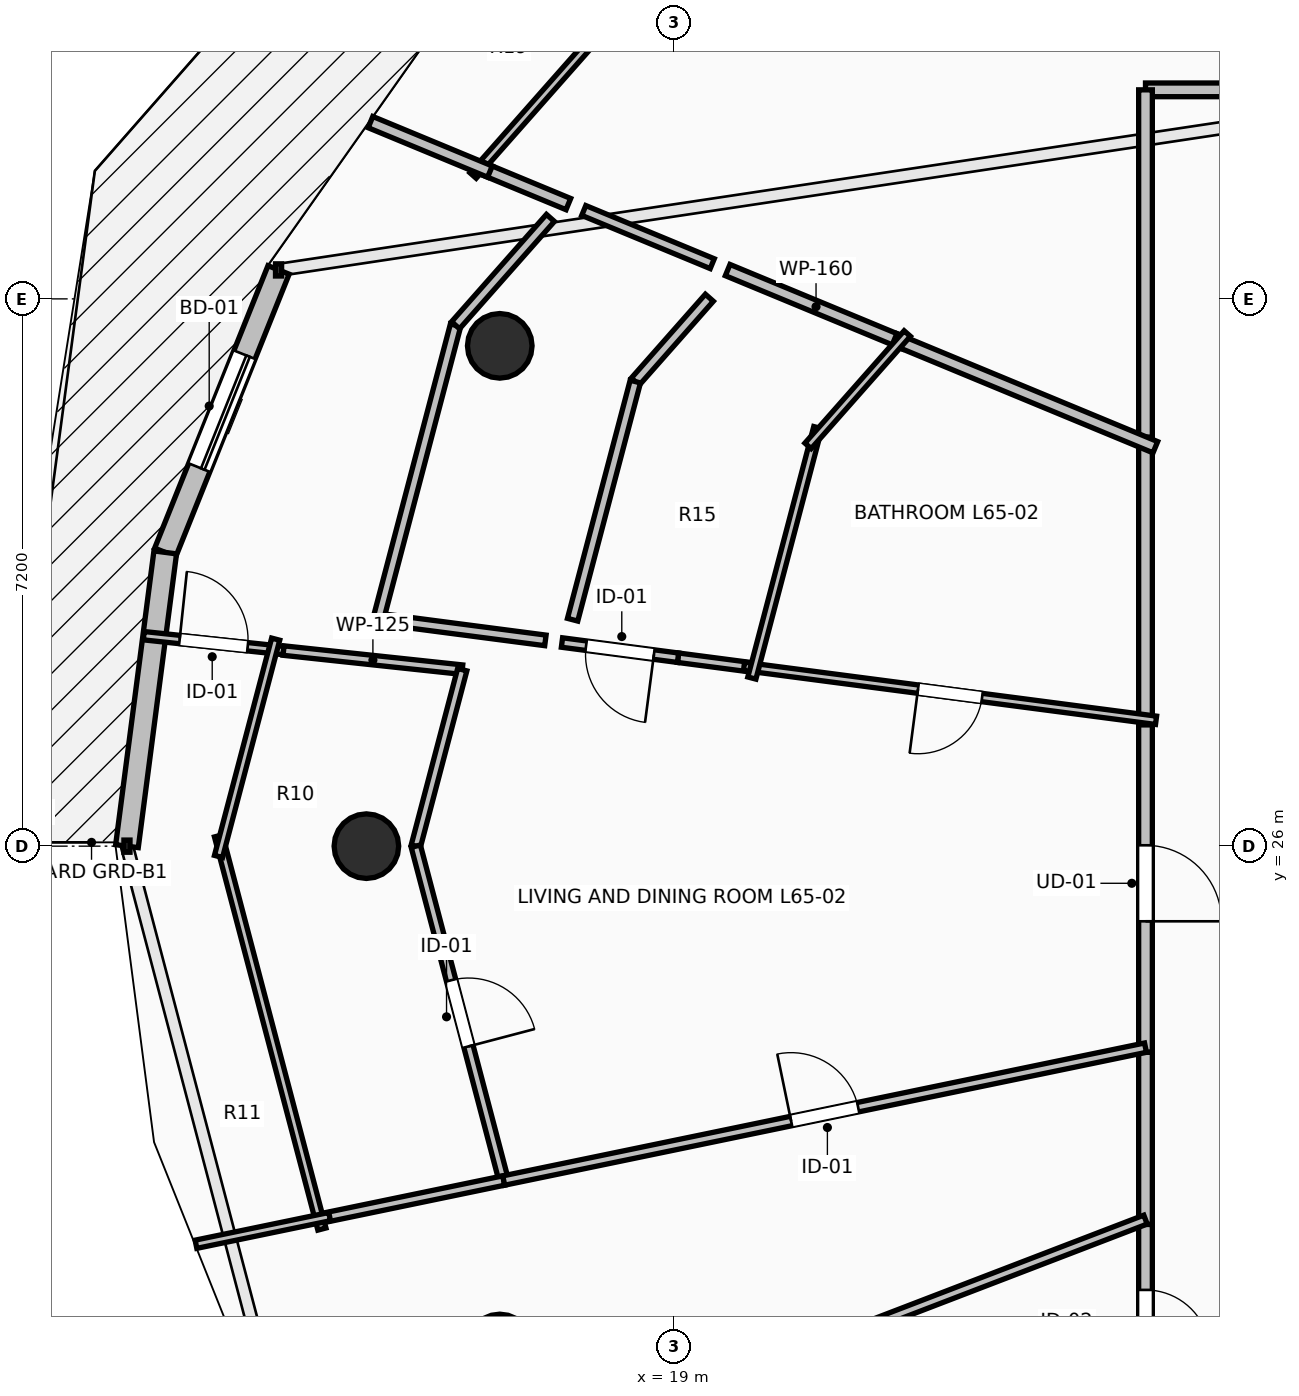
"""IFC4 building model, lengths in metres.
Left out: names, types, materials, properties, quantities, classifications, styles, units other than length and angle.
Written with IfcOpenShell. Run it as: python <this file> out.ifc"""

import sys

from ifc_helpers import new_model, si_unit, direction, frame, frame_2d, origin, origin_2d, place, context, subcontext, project, spatial, rectangle, circle, extrude, element, fill, save


model = new_model("IFC4")
c1 = context("Model", 3, precision=1e-05, world=origin(), true_north=direction((0.0, 1.0)))
c2 = subcontext(c1, "Body", "Model", "MODEL_VIEW")
j1 = project(units=[si_unit("LENGTHUNIT", "METRE"), si_unit("PLANEANGLEUNIT", "RADIAN")], contexts=[c1])
p1 = place(None, origin())
s1 = spatial("IfcSite", under=j1, at=p1, CompositionType="ELEMENT")
p2 = place(p1, origin())
s2 = spatial("IfcBuilding", under=s1, at=p2, CompositionType="ELEMENT")
p3 = place(p2, frame((0.0, 0.0, 241.35)))
s3 = spatial("IfcBuildingStorey", under=s2, at=p3, CompositionType="ELEMENT", Elevation=241.35)
for number, where, z_axis, x_axis in (
    (1, (16.705, 32.582, 0.0), (0.0, 0.0, 1.0), (-0.924, 0.383, 0.0)),
    (2, (14.95, 26.0, 0.0), (0.0, 0.0, 1.0), (-1.0, 0.0, 0.0)),
    (3, (16.705, 19.418, 0.0), (0.0, 0.0, 1.0), (-0.924, -0.383, 0.0)),
):
    element("IfcColumn", number, at=place(p3, frame(where, z_axis=z_axis, x_axis=x_axis)), inside=s3, PredefinedType="COLUMN", context=c2, shape_type="SweptSolid", body=[
        extrude(circle(Radius=0.425, at=origin_2d()), origin(), (0.0, 0.0, 1.0), 3.55),
    ])
p4 = place(p3, frame((13.794, 33.581, 0.0), z_axis=(0.0, 0.0, 1.0), x_axis=(-0.37234708598, -0.928093555393, 0.0)))
e4 = element("IfcWall", 4, at=p4, inside=s3, PredefinedType="STANDARD", context=c2, shape_type="SweptSolid", body=[
    extrude(rectangle(XDim=4.004, YDim=0.3, at=frame_2d((2.002, 0.0))), origin(), (0.0, 0.0, 1.0), 3.29),
])
p5 = place(p4, frame((1.202, 0.0, 0.0)))
e5 = element("IfcOpeningElement", 5, at=p5, cuts=e4, PredefinedType="OPENING", context=c2, shape_type="SweptSolid", body=[
    extrude(rectangle(XDim=1.6, YDim=2.3, at=frame_2d((0.8, 1.15))), frame((0.0, 0.165, 0.0), z_axis=(0.0, -1.0, 0.0), x_axis=(1.0, 0.0, 0.0)), (0.0, 0.0, 1.0), 0.33),
])
p6 = place(p3, frame((12.303, 29.865, 0.0), z_axis=(0.0, 0.0, 1.0), x_axis=(-0.129167789917, -0.991622751881, 0.0)))
e6 = element("IfcWall", 6, at=p6, inside=s3, PredefinedType="STANDARD", context=c2, shape_type="SweptSolid", body=[
    extrude(rectangle(XDim=3.897, YDim=0.3, at=frame_2d((1.949, 0.0))), origin(), (0.0, 0.0, 1.0), 3.29),
])
p7 = place(p3, frame((34.999, 35.95, 0.0), z_axis=(0.0, 0.0, 1.0), x_axis=(-1.0, 0.0, 0.0)))
e7 = element("IfcWall", 7, at=p7, inside=s3, PredefinedType="PARTITIONING", context=c2, shape_type="SweptSolid", body=[
    extrude(rectangle(XDim=9.799, YDim=0.18, at=frame_2d((4.899, 0.0))), origin(), (0.0, 0.0, 1.0), 2.482),
])
p8 = place(p7, frame((4.399, 0.0, 0.0)))
e8 = element("IfcOpeningElement", 8, at=p8, cuts=e7, PredefinedType="OPENING", context=c2, shape_type="SweptSolid", body=[
    extrude(rectangle(XDim=1.0, YDim=2.15, at=frame_2d((0.5, 1.075))), frame((0.0, 0.105, 0.0), z_axis=(0.0, -1.0, 0.0), x_axis=(1.0, 0.0, 0.0)), (0.0, 0.0, 1.0), 0.21),
])
p9 = place(p3, frame((25.2, 35.95, 0.0), z_axis=(0.0, 0.0, 1.0), x_axis=(0.0, -1.0, 0.0)))
e9 = element("IfcWall", 9, at=p9, inside=s3, PredefinedType="PARTITIONING", context=c2, shape_type="SweptSolid", body=[
    extrude(rectangle(XDim=4.708, YDim=0.18, at=frame_2d((2.354, 0.0))), origin(), (0.0, 0.0, 1.0), 2.482),
])
p10 = place(p3, frame((25.2, 27.735, 0.0), z_axis=(0.0, 0.0, 1.0), x_axis=(0.0, -1.0, 0.0)))
e10 = element("IfcWall", 10, at=p10, inside=s3, PredefinedType="PARTITIONING", context=c2, shape_type="SweptSolid", body=[
    extrude(rectangle(XDim=4.447, YDim=0.18, at=frame_2d((2.224, 0.0))), origin(), (0.0, 0.0, 1.0), 2.482),
])
p11 = place(p10, frame((1.723, 0.0, 0.0)))
e11 = element("IfcOpeningElement", 11, at=p11, cuts=e10, PredefinedType="OPENING", context=c2, shape_type="SweptSolid", body=[
    extrude(rectangle(XDim=1.0, YDim=2.15, at=frame_2d((0.5, 1.075))), frame((0.0, 0.105, 0.0), z_axis=(0.0, -1.0, 0.0), x_axis=(1.0, 0.0, 0.0)), (0.0, 0.0, 1.0), 0.21),
])
p12 = place(p3, frame((25.2, 31.382, 0.0), z_axis=(0.0, 0.0, 1.0), x_axis=(0.0, -1.0, 0.0)))
e12 = element("IfcWall", 12, at=p12, inside=s3, PredefinedType="PARTITIONING", context=c2, shape_type="SweptSolid", body=[
    extrude(rectangle(XDim=3.787, YDim=0.18, at=frame_2d((1.894, 0.0))), origin(), (0.0, 0.0, 1.0), 2.482),
])
p13 = place(p3, frame((25.2, 23.288, 0.0), z_axis=(0.0, 0.0, 1.0), x_axis=(0.0, -1.0, 0.0)))
e13 = element("IfcWall", 13, at=p13, inside=s3, PredefinedType="PARTITIONING", context=c2, shape_type="SweptSolid", body=[
    extrude(rectangle(XDim=2.265, YDim=0.18, at=frame_2d((1.133, 0.0))), origin(), (0.0, 0.0, 1.0), 3.29),
])
p14 = place(p3, frame((25.2, 21.023, 0.0), z_axis=(0.0, 0.0, 1.0), x_axis=(0.0, -1.0, 0.0)))
e14 = element("IfcWall", 14, at=p14, inside=s3, PredefinedType="PARTITIONING", context=c2, shape_type="SweptSolid", body=[
    extrude(rectangle(XDim=2.572, YDim=0.18, at=frame_2d((1.286, 0.0))), origin(), (0.0, 0.0, 1.0), 3.29),
])
p15 = place(p14, frame((0.861, 0.0, 0.0)))
e15 = element("IfcOpeningElement", 15, at=p15, cuts=e14, PredefinedType="OPENING", context=c2, shape_type="SweptSolid", body=[
    extrude(rectangle(XDim=0.85, YDim=2.1, at=frame_2d((0.425, 1.05))), frame((0.0, 0.105, 0.0), z_axis=(0.0, -1.0, 0.0), x_axis=(1.0, 0.0, 0.0)), (0.0, 0.0, 1.0), 0.21),
])
p16 = place(p3, frame((20.444, 39.452, 0.0), z_axis=(0.0, 0.0, 1.0), x_axis=(-0.662167862663, -0.749355537549, 0.0)))
e16 = element("IfcWall", 16, at=p16, inside=s3, PredefinedType="PARTITIONING", context=c2, shape_type="SweptSolid", body=[
    extrude(rectangle(XDim=6.177, YDim=0.11, at=frame_2d((3.089, 0.0))), origin(), (0.0, 0.0, 1.0), 3.29),
])
p17 = place(p3, frame((16.446, 34.928, 0.0), z_axis=(0.0, 0.0, 1.0), x_axis=(0.923851056351, -0.382752172663, 0.0)))
e17 = element("IfcWall", 17, at=p17, inside=s3, PredefinedType="PARTITIONING", context=c2, shape_type="SweptSolid", body=[
    extrude(rectangle(XDim=1.257, YDim=0.16, at=frame_2d((0.628, 0.0))), origin(), (0.0, 0.0, 1.0), 3.29),
])
p18 = place(p3, frame((19.703, 33.579, 0.0), z_axis=(0.0, 0.0, 1.0), x_axis=(0.923878502515, -0.382685918986, 0.0)))
e18 = element("IfcWall", 18, at=p18, inside=s3, PredefinedType="PARTITIONING", context=c2, shape_type="SweptSolid", body=[
    extrude(rectangle(XDim=2.517, YDim=0.16, at=frame_2d((1.258, 0.0))), origin(), (0.0, 0.0, 1.0), 2.924),
])
p19 = place(p3, frame((21.899, 32.669, 0.0), z_axis=(0.0, 0.0, 1.0), x_axis=(0.9238685833, -0.382709865029, 0.0)))
e19 = element("IfcWall", 19, at=p19, inside=s3, PredefinedType="PARTITIONING", context=c2, shape_type="SweptSolid", body=[
    extrude(rectangle(XDim=3.713, YDim=0.16, at=frame_2d((1.857, 0.0))), origin(), (0.0, 0.0, 1.0), 2.972),
])
p20 = place(p3, frame((15.004, 35.526, 0.0), z_axis=(0.0, 0.0, 1.0), x_axis=(0.923843638485, -0.382770076719, 0.0)))
e20 = element("IfcWall", 20, at=p20, inside=s3, PredefinedType="PARTITIONING", context=c2, shape_type="SweptSolid", body=[
    extrude(rectangle(XDim=1.701, YDim=0.16, at=frame_2d((0.851, 0.0))), origin(), (0.0, 0.0, 1.0), 3.29),
])
p21 = place(p3, frame((20.057, 28.347, 0.0), z_axis=(0.0, 0.0, 1.0), x_axis=(-0.99150495655, 0.130068909188, 0.0)))
e21 = element("IfcWall", 21, at=p21, inside=s3, PredefinedType="PARTITIONING", context=c2, shape_type="SweptSolid", body=[
    extrude(rectangle(XDim=1.015, YDim=0.125, at=frame_2d((0.508, 0.0))), origin(), (0.0, 0.0, 1.0), 2.924),
])
p22 = place(p3, frame((19.05, 28.479, 0.0), z_axis=(0.0, 0.0, 1.0), x_axis=(-0.991536647804, 0.129827100648, 0.0)))
e22 = element("IfcWall", 22, at=p22, inside=s3, PredefinedType="PARTITIONING", context=c2, shape_type="SweptSolid", body=[
    extrude(rectangle(XDim=1.54, YDim=0.125, at=frame_2d((0.77, 0.0))), origin(), (0.0, 0.0, 1.0), 3.29),
])
p23 = place(p22, frame((0.32, 0.0, 0.0)))
e23 = element("IfcOpeningElement", 23, at=p23, cuts=e22, PredefinedType="OPENING", context=c2, shape_type="SweptSolid", body=[
    extrude(rectangle(XDim=0.9, YDim=2.1, at=frame_2d((0.45, 1.05))), frame((0.0, 0.077, 0.0), z_axis=(0.0, -1.0, 0.0), x_axis=(1.0, 0.0, 0.0)), (0.0, 0.0, 1.0), 0.155),
])
p24 = place(p3, frame((25.339, 27.656, 0.0), z_axis=(0.0, 0.0, 1.0), x_axis=(-0.991543288598, 0.129776372412, 0.0)))
e24 = element("IfcWall", 24, at=p24, inside=s3, PredefinedType="PARTITIONING", context=c2, shape_type="SweptSolid", body=[
    extrude(rectangle(XDim=5.467, YDim=0.11, at=frame_2d((2.733, 0.0))), origin(), (0.0, 0.0, 1.0), 2.482),
])
p25 = place(p24, frame((2.308, 0.0, 0.0)))
e25 = element("IfcOpeningElement", 25, at=p25, cuts=e24, PredefinedType="OPENING", context=c2, shape_type="SweptSolid", body=[
    extrude(rectangle(XDim=0.85, YDim=2.1, at=frame_2d((0.425, 1.05))), frame((0.0, 0.07, 0.0), z_axis=(0.0, -1.0, 0.0), x_axis=(1.0, 0.0, 0.0)), (0.0, 0.0, 1.0), 0.14),
])
p26 = place(p3, frame((12.021, 28.769, 0.0), z_axis=(0.0, 0.0, 1.0), x_axis=(0.994395705484, -0.105722187429, 0.0)))
e26 = element("IfcWall", 26, at=p26, inside=s3, PredefinedType="PARTITIONING", context=c2, shape_type="SweptSolid", body=[
    extrude(rectangle(XDim=1.85, YDim=0.11, at=frame_2d((0.925, 0.0))), origin(), (0.0, 0.0, 1.0), 3.29),
])
p27 = place(p26, frame((0.475, 0.0, 0.0)))
e27 = element("IfcOpeningElement", 27, at=p27, cuts=e26, PredefinedType="OPENING", context=c2, shape_type="SweptSolid", body=[
    extrude(rectangle(XDim=0.9, YDim=2.1, at=frame_2d((0.45, 1.05))), frame((0.0, 0.07, 0.0), z_axis=(0.0, -1.0, 0.0), x_axis=(1.0, 0.0, 0.0)), (0.0, 0.0, 1.0), 0.14),
])
p28 = place(p3, frame((13.86, 28.573, 0.0), z_axis=(0.0, 0.0, 1.0), x_axis=(0.994349321614, -0.106157555574, 0.0)))
e28 = element("IfcWall", 28, at=p28, inside=s3, PredefinedType="PARTITIONING", context=c2, shape_type="SweptSolid", body=[
    extrude(rectangle(XDim=2.364, YDim=0.125, at=frame_2d((1.182, 0.0))), origin(), (0.0, 0.0, 1.0), 2.874),
])
p29 = place(p3, frame((16.211, 28.322, 0.0), z_axis=(0.0, 0.0, 1.0), x_axis=(-0.254408212112, -0.96709692462, 0.0)))
e29 = element("IfcWall", 29, at=p29, inside=s3, PredefinedType="PARTITIONING", context=c2, shape_type="SweptSolid", body=[
    extrude(rectangle(XDim=2.401, YDim=0.125, at=frame_2d((1.201, 0.0))), origin(), (0.0, 0.0, 1.0), 2.482),
])
p30 = place(p3, frame((15.6, 26.0, 0.0), z_axis=(0.0, 0.0, 1.0), x_axis=(0.25436383836, -0.967108596661, 0.0)))
e30 = element("IfcWall", 30, at=p30, inside=s3, PredefinedType="PARTITIONING", context=c2, shape_type="SweptSolid", body=[
    extrude(rectangle(XDim=4.549, YDim=0.125, at=frame_2d((2.274, 0.0))), origin(), (0.0, 0.0, 1.0), 2.482),
])
p31 = place(p30, frame((1.824, 0.0, 0.0)))
e31 = element("IfcOpeningElement", 31, at=p31, cuts=e30, PredefinedType="OPENING", context=c2, shape_type="SweptSolid", body=[
    extrude(rectangle(XDim=0.9, YDim=2.1, at=frame_2d((0.45, 1.05))), frame((0.0, 0.077, 0.0), z_axis=(0.0, -1.0, 0.0), x_axis=(1.0, 0.0, 0.0)), (0.0, 0.0, 1.0), 0.155),
])
p32 = place(p3, frame((16.757, 21.601, 0.0), z_axis=(0.0, 0.0, 1.0), x_axis=(-0.979193678003, -0.2029279206, 0.0)))
e32 = element("IfcWall", 32, at=p32, inside=s3, PredefinedType="PARTITIONING", context=c2, shape_type="SweptSolid", body=[
    extrude(rectangle(XDim=2.479, YDim=0.125, at=frame_2d((1.24, 0.0))), origin(), (0.0, 0.0, 1.0), 2.874),
])
p33 = place(p3, frame((16.757, 21.601, 0.0), z_axis=(0.0, 0.0, 1.0), x_axis=(0.979226116247, 0.20277133244, 0.0)))
e33 = element("IfcWall", 33, at=p33, inside=s3, PredefinedType="PARTITIONING", context=c2, shape_type="SweptSolid", body=[
    extrude(rectangle(XDim=8.622, YDim=0.125, at=frame_2d((4.311, 0.0))), origin(), (0.0, 0.0, 1.0), 2.924),
])
p34 = place(p33, frame((3.861, 0.0, 0.0)))
e34 = element("IfcOpeningElement", 34, at=p34, cuts=e33, PredefinedType="OPENING", context=c2, shape_type="SweptSolid", body=[
    extrude(rectangle(XDim=0.9, YDim=2.1, at=frame_2d((0.45, 1.05))), frame((0.0, 0.077, 0.0), z_axis=(0.0, -1.0, 0.0), x_axis=(1.0, 0.0, 0.0)), (0.0, 0.0, 1.0), 0.155),
])
p35 = place(p3, frame((20.021, 28.212, 0.0), z_axis=(0.0, 0.0, 1.0), x_axis=(0.254539154478, 0.967062468943, 0.0)))
e35 = element("IfcWall", 35, at=p35, inside=s3, PredefinedType="PARTITIONING", context=c2, shape_type="SweptSolid", body=[
    extrude(rectangle(XDim=3.407, YDim=0.11, at=frame_2d((1.704, 0.0))), origin(), (0.0, 0.0, 1.0), 2.482),
])
p36 = place(p3, frame((20.76, 31.266, 0.0), z_axis=(0.0, 0.0, 1.0), x_axis=(0.662047420969, 0.749461948593, 0.0)))
e36 = element("IfcWall", 36, at=p36, inside=s3, PredefinedType="PARTITIONING", context=c2, shape_type="SweptSolid", body=[
    extrude(rectangle(XDim=1.972, YDim=0.11, at=frame_2d((0.986, 0.0))), origin(), (0.0, 0.0, 1.0), 3.29),
])
p37 = place(p3, frame((14.365, 20.963, 0.0), z_axis=(0.0, 0.0, 1.0), x_axis=(-0.254288836667, 0.967128320104, 0.0)))
e37 = element("IfcWall", 37, at=p37, inside=s3, PredefinedType="PARTITIONING", context=c2, shape_type="SweptSolid", body=[
    extrude(rectangle(XDim=5.349, YDim=0.11, at=frame_2d((2.674, 0.0))), origin(), (0.0, 0.0, 1.0), 3.29),
])
p38 = place(p3, frame((13.004, 25.865, 0.0), z_axis=(0.0, 0.0, 1.0), x_axis=(0.254448582557, 0.967086303716, 0.0)))
e38 = element("IfcWall", 38, at=p38, inside=s3, PredefinedType="PARTITIONING", context=c2, shape_type="SweptSolid", body=[
    extrude(rectangle(XDim=2.956, YDim=0.11, at=frame_2d((1.478, 0.0))), origin(), (0.0, 0.0, 1.0), 3.29),
])
p39 = place(p3, frame((12.708, 20.763, 0.0), z_axis=(0.0, 0.0, 1.0), x_axis=(0.979256697864, 0.202623591143, 0.0)))
e39 = element("IfcWall", 39, at=p39, inside=s3, PredefinedType="PARTITIONING", context=c2, shape_type="SweptSolid", body=[
    extrude(rectangle(XDim=1.795, YDim=0.11, at=frame_2d((0.898, 0.0))), origin(), (0.0, 0.0, 1.0), 3.29),
])
p40 = place(p3, frame((14.748, 17.074, 0.0), z_axis=(0.0, 0.0, 1.0), x_axis=(0.93355564233, 0.358432507836, 0.0)))
e40 = element("IfcWall", 40, at=p40, inside=s3, PredefinedType="PARTITIONING", context=c2, shape_type="SweptSolid", body=[
    extrude(rectangle(XDim=11.196, YDim=0.125, at=frame_2d((5.598, 0.0))), origin(), (0.0, 0.0, 1.0), 2.482),
])
p41 = place(p3, frame((17.81, 34.363, 0.0), z_axis=(0.0, 0.0, 1.0), x_axis=(0.923888322618, -0.382662210481, 0.0)))
e41 = element("IfcWall", 41, at=p41, inside=s3, PredefinedType="PARTITIONING", context=c2, shape_type="SweptSolid", body=[
    extrude(rectangle(XDim=1.829, YDim=0.14, at=frame_2d((0.915, 0.0))), origin(), (0.0, 0.0, 1.0), 2.874),
])
p42 = place(p3, frame((17.305, 28.707, 0.0), z_axis=(0.0, 0.0, 1.0), x_axis=(-0.991583198316, 0.129471081011, 0.0)))
e42 = element("IfcWall", 42, at=p42, inside=s3, PredefinedType="PARTITIONING", context=c2, shape_type="SweptSolid", body=[
    extrude(rectangle(XDim=2.216, YDim=0.14, at=frame_2d((1.108, 0.0))), origin(), (0.0, 0.0, 1.0), 2.874),
])
p43 = place(p3, frame((15.108, 28.994, 0.0), z_axis=(0.0, 0.0, 1.0), x_axis=(0.254393917139, 0.967100684997, 0.0)))
e43 = element("IfcWall", 43, at=p43, inside=s3, PredefinedType="PARTITIONING", context=c2, shape_type="SweptSolid", body=[
    extrude(rectangle(XDim=3.99, YDim=0.14, at=frame_2d((1.995, 0.0))), origin(), (0.0, 0.0, 1.0), 3.29),
])
p44 = place(p3, frame((16.123, 32.853, 0.0), z_axis=(0.0, 0.0, 1.0), x_axis=(0.662302679983, 0.749236384652, 0.0)))
e44 = element("IfcWall", 44, at=p44, inside=s3, PredefinedType="PARTITIONING", context=c2, shape_type="SweptSolid", body=[
    extrude(rectangle(XDim=1.885, YDim=0.14, at=frame_2d((0.942, 0.0))), origin(), (0.0, 0.0, 1.0), 3.29),
])
p45 = place(p3, frame((19.462, 33.215, 0.0), z_axis=(0.0, 0.0, 1.0), x_axis=(-0.661857573224, -0.749629610385, 0.0)))
e45 = element("IfcWall", 45, at=p45, inside=s3, PredefinedType="PARTITIONING", context=c2, shape_type="SweptSolid", body=[
    extrude(rectangle(XDim=1.471, YDim=0.14, at=frame_2d((0.736, 0.0))), origin(), (0.0, 0.0, 1.0), 2.482),
])
p46 = place(p3, frame((18.488, 32.112, 0.0), z_axis=(0.0, 0.0, 1.0), x_axis=(-0.254626828673, -0.967039388091, 0.0)))
e46 = element("IfcWall", 46, at=p46, inside=s3, PredefinedType="PARTITIONING", context=c2, shape_type="SweptSolid", body=[
    extrude(rectangle(XDim=3.24, YDim=0.14, at=frame_2d((1.62, 0.0))), origin(), (0.0, 0.0, 1.0), 2.482),
])
p47 = place(p5, origin())
e47 = element("IfcDoor", 47, at=p47, inside=s3, OperationType="SLIDING_TO_LEFT", PredefinedType="DOOR", context=c2, shape_type="SweptSolid", body=[
    extrude(rectangle(XDim=1.6, YDim=2.3, at=frame_2d((0.8, 1.15))), frame((0.0, 0.025, 0.0), z_axis=(0.0, -1.0, 0.0), x_axis=(1.0, 0.0, 0.0)), (0.0, 0.0, 1.0), 0.05),
])
fill(e5, e47)
p48 = place(p11, origin())
e48 = element("IfcDoor", 48, at=p48, inside=s3, OperationType="SINGLE_SWING_RIGHT", PredefinedType="DOOR", context=c2, shape_type="SweptSolid", body=[
    extrude(rectangle(XDim=1.0, YDim=2.15, at=frame_2d((0.5, 1.075))), frame((0.0, 0.025, 0.0), z_axis=(0.0, -1.0, 0.0), x_axis=(1.0, 0.0, 0.0)), (0.0, 0.0, 1.0), 0.05),
])
fill(e11, e48)
p49 = place(p23, origin())
e49 = element("IfcDoor", 49, at=p49, inside=s3, OperationType="SINGLE_SWING_LEFT", PredefinedType="DOOR", context=c2, shape_type="SweptSolid", body=[
    extrude(rectangle(XDim=0.9, YDim=2.1, at=frame_2d((0.45, 1.05))), frame((0.0, 0.025, 0.0), z_axis=(0.0, -1.0, 0.0), x_axis=(1.0, 0.0, 0.0)), (0.0, 0.0, 1.0), 0.05),
])
fill(e23, e49)
p50 = place(p25, origin())
e50 = element("IfcDoor", 50, at=p50, inside=s3, OperationType="SINGLE_SWING_RIGHT", PredefinedType="DOOR", context=c2, shape_type="SweptSolid", body=[
    extrude(rectangle(XDim=0.85, YDim=2.1, at=frame_2d((0.425, 1.05))), frame((0.0, 0.025, 0.0), z_axis=(0.0, -1.0, 0.0), x_axis=(1.0, 0.0, 0.0)), (0.0, 0.0, 1.0), 0.05),
])
fill(e25, e50)
p51 = place(p27, origin())
e51 = element("IfcDoor", 51, at=p51, inside=s3, OperationType="SINGLE_SWING_LEFT", PredefinedType="DOOR", context=c2, shape_type="SweptSolid", body=[
    extrude(rectangle(XDim=0.9, YDim=2.1, at=frame_2d((0.45, 1.05))), frame((0.0, 0.025, 0.0), z_axis=(0.0, -1.0, 0.0), x_axis=(1.0, 0.0, 0.0)), (0.0, 0.0, 1.0), 0.05),
])
fill(e27, e51)
p52 = place(p31, origin())
e52 = element("IfcDoor", 52, at=p52, inside=s3, OperationType="SINGLE_SWING_RIGHT", PredefinedType="DOOR", context=c2, shape_type="SweptSolid", body=[
    extrude(rectangle(XDim=0.9, YDim=2.1, at=frame_2d((0.45, 1.05))), frame((0.0, 0.025, 0.0), z_axis=(0.0, -1.0, 0.0), x_axis=(1.0, 0.0, 0.0)), (0.0, 0.0, 1.0), 0.05),
])
fill(e31, e52)
p53 = place(p34, origin())
e53 = element("IfcDoor", 53, at=p53, inside=s3, OperationType="SINGLE_SWING_LEFT", PredefinedType="DOOR", context=c2, shape_type="SweptSolid", body=[
    extrude(rectangle(XDim=0.9, YDim=2.1, at=frame_2d((0.45, 1.05))), frame((0.0, 0.025, 0.0), z_axis=(0.0, -1.0, 0.0), x_axis=(1.0, 0.0, 0.0)), (0.0, 0.0, 1.0), 0.05),
])
fill(e34, e53)
p54 = place(p15, origin())
e54 = element("IfcDoor", 54, at=p54, inside=s3, OperationType="SINGLE_SWING_RIGHT", PredefinedType="DOOR", context=c2, shape_type="SweptSolid", body=[
    extrude(rectangle(XDim=0.85, YDim=2.1, at=frame_2d((0.425, 1.05))), frame((0.0, 0.025, 0.0), z_axis=(0.0, -1.0, 0.0), x_axis=(1.0, 0.0, 0.0)), (0.0, 0.0, 1.0), 0.05),
])
fill(e15, e54)
save(model, sys.argv[1])
